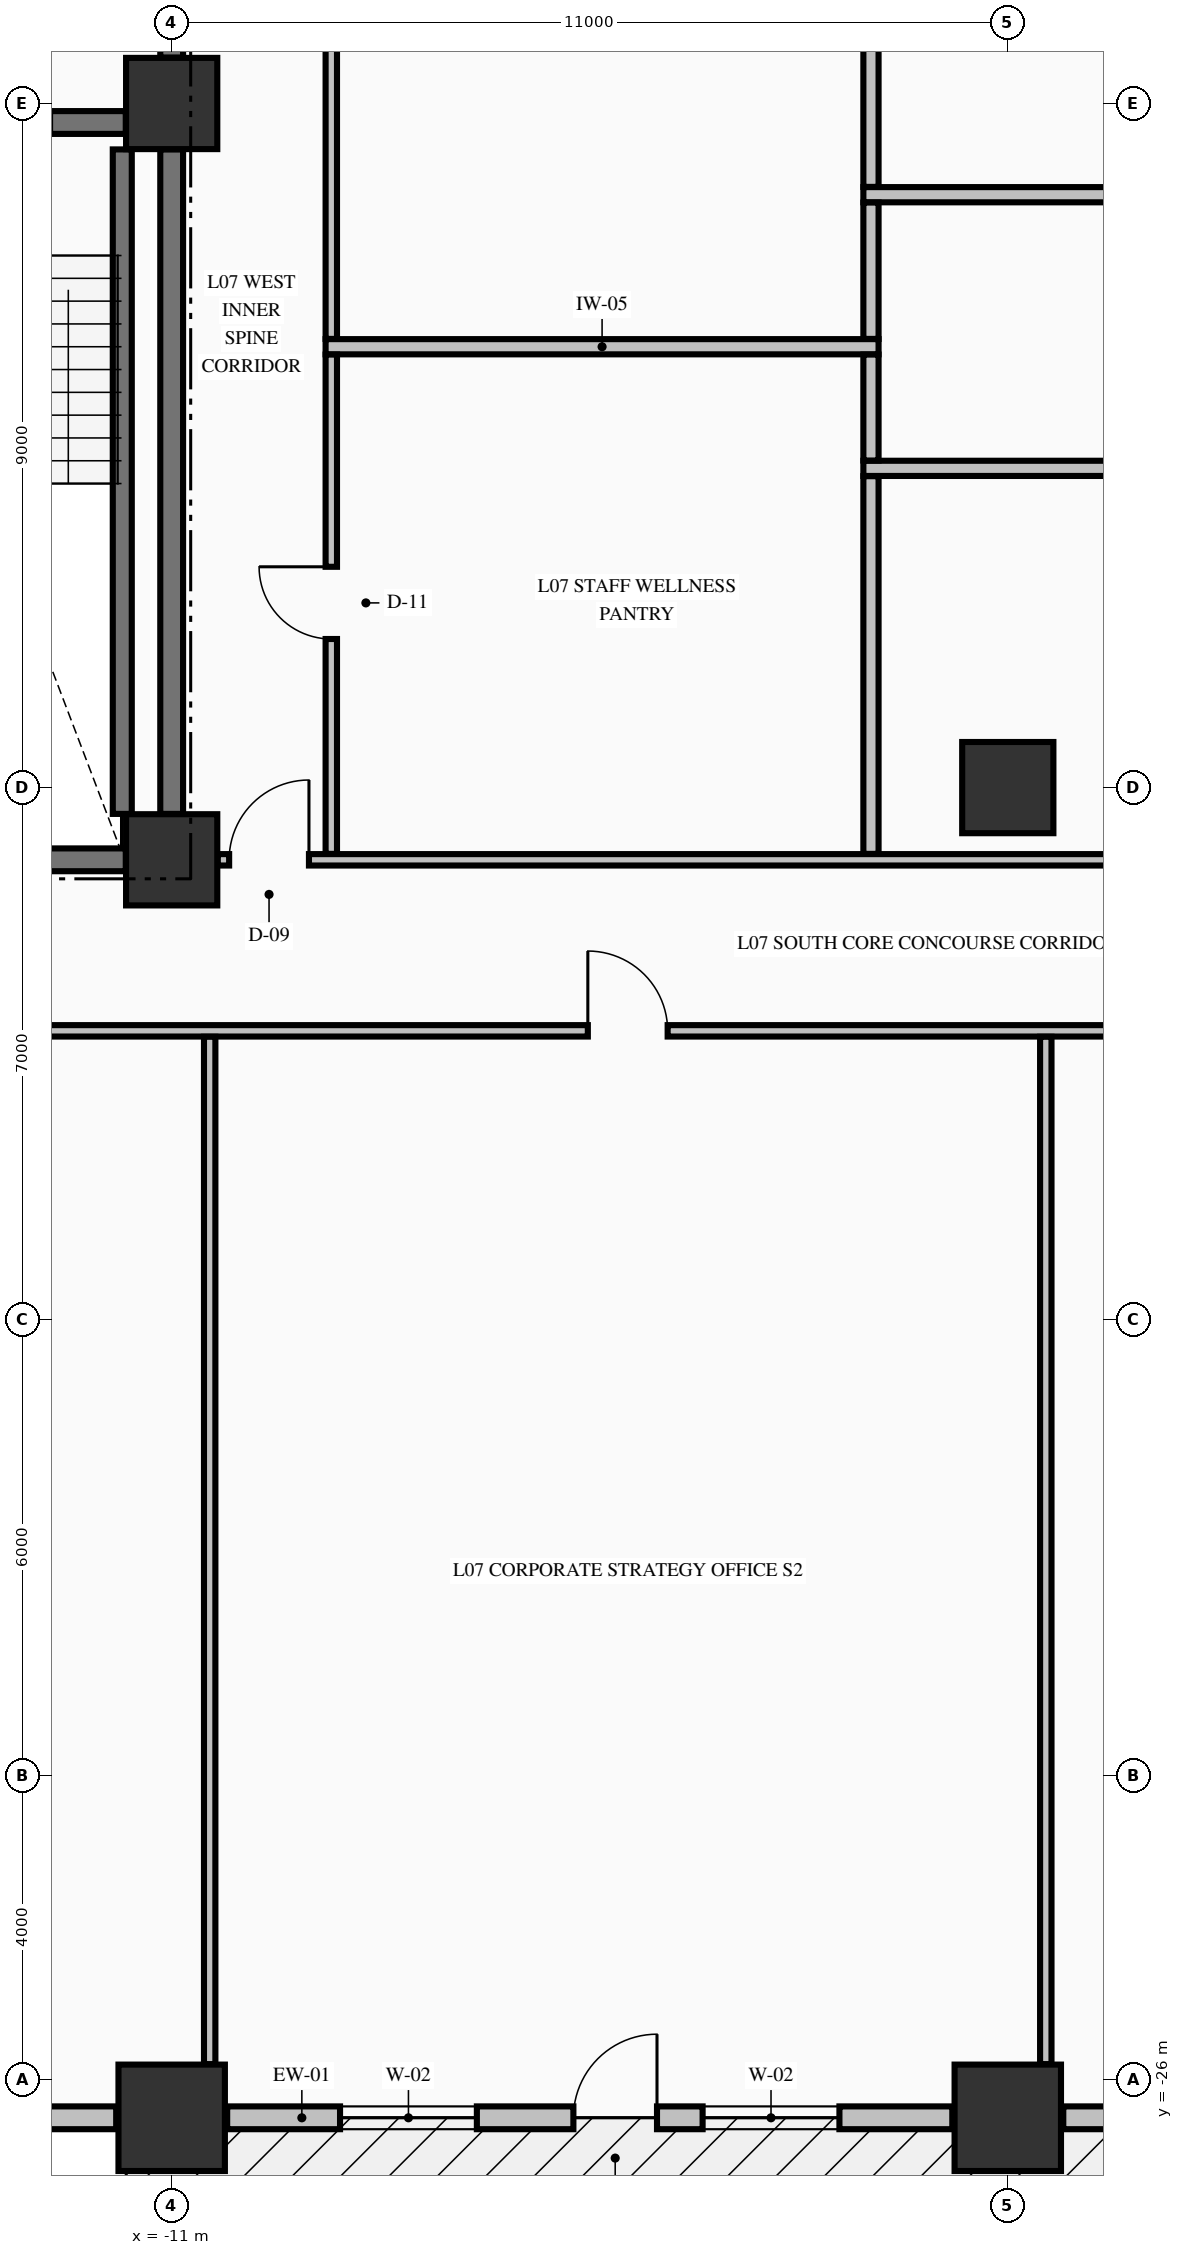
"""IFC4 building model, lengths in metres.
Left out: names, types, materials, properties, quantities, classifications, styles, units other than length and angle.
Written with IfcOpenShell. Run it as: python <this file> out.ifc"""

import sys

from ifc_helpers import new_model, si_unit, direction, frame, frame_2d, origin, origin_2d, place, context, subcontext, project, spatial, rectangle, extrude, element, fill, save


model = new_model("IFC4")
c1 = context("Model", 3, precision=1e-05, world=origin(), true_north=direction((0.0, 1.0)))
c2 = subcontext(c1, "Body", "Model", "MODEL_VIEW")
j1 = project(units=[si_unit("LENGTHUNIT", "METRE"), si_unit("PLANEANGLEUNIT", "RADIAN")], contexts=[c1])
p1 = place(None, origin())
s1 = spatial("IfcSite", under=j1, at=p1, CompositionType="ELEMENT")
p2 = place(p1, origin())
s2 = spatial("IfcBuilding", under=s1, at=p2, CompositionType="ELEMENT")
p3 = place(p2, frame((0.0, 0.0, 34.34)))
s3 = spatial("IfcBuildingStorey", under=s2, at=p3, CompositionType="ELEMENT", Elevation=34.34)
for number, where, z_axis, x_axis in (
    (1, (-11.0, -26.5, -0.3), (0.0, 0.0, 1.0), (1.0, 0.0, 0.0)),
    (2, (0.0, -26.5, -0.3), (0.0, 0.0, 1.0), (1.0, 0.0, 0.0)),
):
    element("IfcColumn", number, at=place(p3, frame(where, z_axis=z_axis, x_axis=x_axis)), inside=s3, PredefinedType="COLUMN", context=c2, shape_type="SweptSolid", body=[
        extrude(rectangle(XDim=1.4, YDim=1.4, at=origin_2d()), origin(), (0.0, 0.0, 1.0), 3.62),
    ])
for number, where, z_axis, x_axis in (
    (3, (-11.0, -9.95, -0.3), (0.0, 0.0, 1.0), (1.0, 0.0, 0.0)),
    (4, (-11.0, 0.0, -0.3), (0.0, 0.0, 1.0), (1.0, 0.0, 0.0)),
    (5, (0.0, -9.0, -0.3), (0.0, 0.0, 1.0), (1.0, 0.0, 0.0)),
):
    element("IfcColumn", number, at=place(p3, frame(where, z_axis=z_axis, x_axis=x_axis)), inside=s3, PredefinedType="COLUMN", context=c2, shape_type="SweptSolid", body=[
        extrude(rectangle(XDim=1.2, YDim=1.2, at=origin_2d()), origin(), (0.0, 0.0, 1.0), 3.62),
    ])
p4 = place(p3, frame((-19.77, -26.5, 0.0), z_axis=(0.0, 0.0, 1.0), x_axis=(1.0, 0.0, 0.0)))
e6 = element("IfcWall", 6, at=p4, inside=s3, PredefinedType="STANDARD", context=c2, shape_type="SweptSolid", body=[
    extrude(rectangle(XDim=8.04, YDim=0.3, at=frame_2d((4.02, 0.0))), origin(), (0.0, 0.0, 1.0), 2.712),
])
p5 = place(p3, frame((-10.27, -26.5, 0.0), z_axis=(0.0, 0.0, 1.0), x_axis=(1.0, 0.0, 0.0)))
e7 = element("IfcWall", 7, at=p5, inside=s3, PredefinedType="STANDARD", context=c2, shape_type="SweptSolid", body=[
    extrude(rectangle(XDim=9.54, YDim=0.3, at=frame_2d((4.77, 0.0))), origin(), (0.0, 0.0, 1.0), 2.712),
])
p6 = place(p5, frame((4.555, 0.0, 0.0)))
e8 = element("IfcOpeningElement", 8, at=p6, cuts=e7, PredefinedType="OPENING", context=c2, shape_type="SweptSolid", body=[
    extrude(rectangle(XDim=1.1, YDim=2.15, at=frame_2d((0.55, 1.075))), frame((0.0, 0.16, 0.0), z_axis=(0.0, -1.0, 0.0), x_axis=(1.0, 0.0, 0.0)), (0.0, 0.0, 1.0), 0.32),
])
p7 = place(p5, frame((1.485, 0.0, 0.78)))
e9 = element("IfcOpeningElement", 9, at=p7, cuts=e7, PredefinedType="OPENING", context=c2, shape_type="SweptSolid", body=[
    extrude(rectangle(XDim=1.8, YDim=1.72, at=frame_2d((0.9, 0.86))), frame((0.0, 0.16, 0.0), z_axis=(0.0, -1.0, 0.0), x_axis=(1.0, 0.0, 0.0)), (0.0, 0.0, 1.0), 0.32),
])
p8 = place(p5, frame((6.255, 0.0, 0.78)))
e10 = element("IfcOpeningElement", 10, at=p8, cuts=e7, PredefinedType="OPENING", context=c2, shape_type="SweptSolid", body=[
    extrude(rectangle(XDim=1.8, YDim=1.72, at=frame_2d((0.9, 0.86))), frame((0.0, 0.16, 0.0), z_axis=(0.0, -1.0, 0.0), x_axis=(1.0, 0.0, 0.0)), (0.0, 0.0, 1.0), 0.32),
])
p9 = place(p3, frame((0.73, -26.5, 0.0), z_axis=(0.0, 0.0, 1.0), x_axis=(1.0, 0.0, 0.0)))
e11 = element("IfcWall", 11, at=p9, inside=s3, PredefinedType="STANDARD", context=c2, shape_type="SweptSolid", body=[
    extrude(rectangle(XDim=9.54, YDim=0.3, at=frame_2d((4.77, 0.0))), origin(), (0.0, 0.0, 1.0), 2.712),
])
p10 = place(p9, frame((1.485, 0.0, 0.78)))
e12 = element("IfcOpeningElement", 12, at=p10, cuts=e11, PredefinedType="OPENING", context=c2, shape_type="SweptSolid", body=[
    extrude(rectangle(XDim=1.8, YDim=1.72, at=frame_2d((0.9, 0.86))), frame((0.0, 0.16, 0.0), z_axis=(0.0, -1.0, 0.0), x_axis=(1.0, 0.0, 0.0)), (0.0, 0.0, 1.0), 0.32),
])
p11 = place(p9, frame((3.87, 0.0, 0.78)))
e13 = element("IfcOpeningElement", 13, at=p11, cuts=e11, PredefinedType="OPENING", context=c2, shape_type="SweptSolid", body=[
    extrude(rectangle(XDim=1.8, YDim=1.72, at=frame_2d((0.9, 0.86))), frame((0.0, 0.16, 0.0), z_axis=(0.0, -1.0, 0.0), x_axis=(1.0, 0.0, 0.0)), (0.0, 0.0, 1.0), 0.32),
])
p12 = place(p9, frame((6.255, 0.0, 0.78)))
e14 = element("IfcOpeningElement", 14, at=p12, cuts=e11, PredefinedType="OPENING", context=c2, shape_type="SweptSolid", body=[
    extrude(rectangle(XDim=1.8, YDim=1.72, at=frame_2d((0.9, 0.86))), frame((0.0, 0.16, 0.0), z_axis=(0.0, -1.0, 0.0), x_axis=(1.0, 0.0, 0.0)), (0.0, 0.0, 1.0), 0.32),
])
p13 = place(p3, frame((-14.7, -9.95, 0.0), z_axis=(0.0, 0.0, 1.0), x_axis=(1.0, 0.0, 0.0)))
e15 = element("IfcWall", 15, at=p13, inside=s3, PredefinedType="SHEAR", context=c2, shape_type="SweptSolid", body=[
    extrude(rectangle(XDim=3.096, YDim=0.3, at=frame_2d((1.548, 0.0))), origin(), (0.0, 0.0, 1.0), 3.32),
])
p14 = place(p3, frame((-19.396, -0.25, 0.0), z_axis=(0.0, 0.0, 1.0), x_axis=(1.0, 0.0, 0.0)))
e16 = element("IfcWall", 16, at=p14, inside=s3, PredefinedType="SHEAR", context=c2, shape_type="SweptSolid", body=[
    extrude(rectangle(XDim=7.792, YDim=0.3, at=frame_2d((3.896, 0.0))), origin(), (0.0, 0.0, 1.0), 3.32),
])
p15 = place(p14, frame((5.696, 0.0, 0.0)))
e17 = element("IfcOpeningElement", 17, at=p15, cuts=e16, PredefinedType="OPENING", context=c2, shape_type="SweptSolid", body=[
    extrude(rectangle(XDim=1.1, YDim=2.15, at=frame_2d((0.55, 1.075))), frame((0.0, 0.16, 0.0), z_axis=(0.0, -1.0, 0.0), x_axis=(1.0, 0.0, 0.0)), (0.0, 0.0, 1.0), 0.32),
])
p16 = place(p3, frame((-23.835, -12.2, 0.0), z_axis=(0.0, 0.0, 1.0), x_axis=(1.0, 0.0, 0.0)))
e18 = element("IfcWall", 18, at=p16, inside=s3, PredefinedType="PARTITIONING", context=c2, shape_type="SweptSolid", body=[
    extrude(rectangle(XDim=52.67, YDim=0.15, at=frame_2d((26.335, 0.0))), origin(), (0.0, 0.0, 1.0), 3.32),
])
p17 = place(p16, frame((8.16, 0.0, 0.0)))
e19 = element("IfcOpeningElement", 19, at=p17, cuts=e18, PredefinedType="OPENING", context=c2, shape_type="SweptSolid", body=[
    extrude(rectangle(XDim=1.05, YDim=2.15, at=frame_2d((0.525, 1.075))), frame((0.0, 0.085, 0.0), z_axis=(0.0, -1.0, 0.0), x_axis=(1.0, 0.0, 0.0)), (0.0, 0.0, 1.0), 0.17),
])
p18 = place(p16, frame((18.31, 0.0, 0.0)))
e20 = element("IfcOpeningElement", 20, at=p18, cuts=e18, PredefinedType="OPENING", context=c2, shape_type="SweptSolid", body=[
    extrude(rectangle(XDim=1.05, YDim=2.15, at=frame_2d((0.525, 1.075))), frame((0.0, 0.085, 0.0), z_axis=(0.0, -1.0, 0.0), x_axis=(1.0, 0.0, 0.0)), (0.0, 0.0, 1.0), 0.17),
])
p19 = place(p16, frame((41.46, 0.0, 0.0)))
e21 = element("IfcOpeningElement", 21, at=p19, cuts=e18, PredefinedType="OPENING", context=c2, shape_type="SweptSolid", body=[
    extrude(rectangle(XDim=1.05, YDim=2.15, at=frame_2d((0.525, 1.075))), frame((0.0, 0.085, 0.0), z_axis=(0.0, -1.0, 0.0), x_axis=(1.0, 0.0, 0.0)), (0.0, 0.0, 1.0), 0.17),
])
p20 = place(p3, frame((-10.394, -9.95, 0.0), z_axis=(0.0, 0.0, 1.0), x_axis=(1.0, 0.0, 0.0)))
e22 = element("IfcWall", 22, at=p20, inside=s3, PredefinedType="PARTITIONING", context=c2, shape_type="SweptSolid", body=[
    extrude(rectangle(XDim=20.788, YDim=0.15, at=frame_2d((10.394, 0.0))), origin(), (0.0, 0.0, 1.0), 3.32),
])
p21 = place(p20, frame((0.15, 0.0, 0.0)))
e23 = element("IfcOpeningElement", 23, at=p21, cuts=e22, PredefinedType="OPENING", context=c2, shape_type="SweptSolid", body=[
    extrude(rectangle(XDim=1.05, YDim=2.15, at=frame_2d((0.525, 1.075))), frame((0.0, 0.085, 0.0), z_axis=(0.0, -1.0, 0.0), x_axis=(1.0, 0.0, 0.0)), (0.0, 0.0, 1.0), 0.17),
])
p22 = place(p20, frame((19.588, 0.0, 0.0)))
e24 = element("IfcOpeningElement", 24, at=p22, cuts=e22, PredefinedType="OPENING", context=c2, shape_type="SweptSolid", body=[
    extrude(rectangle(XDim=1.05, YDim=2.15, at=frame_2d((0.525, 1.075))), frame((0.0, 0.085, 0.0), z_axis=(0.0, -1.0, 0.0), x_axis=(1.0, 0.0, 0.0)), (0.0, 0.0, 1.0), 0.17),
])
p23 = place(p20, frame((11.969, 0.0, 0.0)))
e25 = element("IfcOpeningElement", 25, at=p23, cuts=e22, PredefinedType="OPENING", context=c2, shape_type="SweptSolid", body=[
    extrude(rectangle(XDim=0.95, YDim=2.15, at=frame_2d((0.475, 1.075))), frame((0.0, 0.085, 0.0), z_axis=(0.0, -1.0, 0.0), x_axis=(1.0, 0.0, 0.0)), (0.0, 0.0, 1.0), 0.17),
])
p24 = place(p3, frame((-1.9, -4.8, 0.0), z_axis=(0.0, 0.0, 1.0), x_axis=(1.0, 0.0, 0.0)))
e26 = element("IfcWall", 26, at=p24, inside=s3, PredefinedType="PARTITIONING", context=c2, shape_type="SweptSolid", body=[
    extrude(rectangle(XDim=10.875, YDim=0.2, at=frame_2d((5.438, 0.0))), origin(), (0.0, 0.0, 1.0), 3.32),
])
p25 = place(p3, frame((-8.975, -3.2, 0.0), z_axis=(0.0, 0.0, 1.0), x_axis=(1.0, 0.0, 0.0)))
e27 = element("IfcWall", 27, at=p25, inside=s3, PredefinedType="PARTITIONING", context=c2, shape_type="SweptSolid", body=[
    extrude(rectangle(XDim=7.275, YDim=0.2, at=frame_2d((3.638, 0.0))), origin(), (0.0, 0.0, 1.0), 3.32),
])
p26 = place(p3, frame((-1.9, -1.2, 0.0), z_axis=(0.0, 0.0, 1.0), x_axis=(1.0, 0.0, 0.0)))
e28 = element("IfcWall", 28, at=p26, inside=s3, PredefinedType="PARTITIONING", context=c2, shape_type="SweptSolid", body=[
    extrude(rectangle(XDim=10.875, YDim=0.2, at=frame_2d((5.438, 0.0))), origin(), (0.0, 0.0, 1.0), 3.32),
])
p27 = place(p3, frame((-11.65, -9.346, 0.0), z_axis=(0.0, 0.0, 1.0), x_axis=(0.0, 1.0, 0.0)))
e29 = element("IfcWall", 29, at=p27, inside=s3, PredefinedType="SOLIDWALL", context=c2, shape_type="SweptSolid", body=[
    extrude(rectangle(XDim=8.742, YDim=0.25, at=frame_2d((4.371, 0.0))), origin(), (0.0, 0.0, 1.0), 3.32),
])
p28 = place(p3, frame((-11.0, -9.346, 0.0), z_axis=(0.0, 0.0, 1.0), x_axis=(0.0, 1.0, 0.0)))
e30 = element("IfcWall", 30, at=p28, inside=s3, PredefinedType="SHEAR", context=c2, shape_type="SweptSolid", body=[
    extrude(rectangle(XDim=8.742, YDim=0.3, at=frame_2d((4.371, 0.0))), origin(), (0.0, 0.0, 1.0), 3.32),
])
p29 = place(p3, frame((-11.0, 0.604, 0.0), z_axis=(0.0, 0.0, 1.0), x_axis=(0.0, 1.0, 0.0)))
e31 = element("IfcWall", 31, at=p29, inside=s3, PredefinedType="SHEAR", context=c2, shape_type="SweptSolid", body=[
    extrude(rectangle(XDim=2.144, YDim=0.3, at=frame_2d((1.072, 0.0))), origin(), (0.0, 0.0, 1.0), 3.32),
])
p30 = place(p29, frame((0.496, 0.0, 0.0)))
e32 = element("IfcOpeningElement", 32, at=p30, cuts=e31, PredefinedType="OPENING", context=c2, shape_type="SweptSolid", body=[
    extrude(rectangle(XDim=1.1, YDim=2.15, at=frame_2d((0.55, 1.075))), frame((0.0, 0.16, 0.0), z_axis=(0.0, -1.0, 0.0), x_axis=(1.0, 0.0, 0.0)), (0.0, 0.0, 1.0), 0.32),
])
p31 = place(p3, frame((-10.5, -25.794, 0.0), z_axis=(0.0, 0.0, 1.0), x_axis=(0.0, 1.0, 0.0)))
e33 = element("IfcWall", 33, at=p31, inside=s3, PredefinedType="PARTITIONING", context=c2, shape_type="SweptSolid", body=[
    extrude(rectangle(XDim=13.516, YDim=0.15, at=frame_2d((6.758, 0.0))), origin(), (0.0, 0.0, 1.0), 3.32),
])
p32 = place(p3, frame((-8.9, -9.872, 0.0), z_axis=(0.0, 0.0, 1.0), x_axis=(0.0, 1.0, 0.0)))
e34 = element("IfcWall", 34, at=p32, inside=s3, PredefinedType="PARTITIONING", context=c2, shape_type="SweptSolid", body=[
    extrude(rectangle(XDim=6.569, YDim=0.15, at=frame_2d((3.285, 0.0))), origin(), (0.0, 0.0, 1.0), 3.32),
])
p33 = place(p32, frame((2.827, 0.0, 0.0)))
e35 = element("IfcOpeningElement", 35, at=p33, cuts=e34, PredefinedType="OPENING", context=c2, shape_type="SweptSolid", body=[
    extrude(rectangle(XDim=0.95, YDim=2.15, at=frame_2d((0.475, 1.075))), frame((0.0, 0.085, 0.0), z_axis=(0.0, -1.0, 0.0), x_axis=(1.0, 0.0, 0.0)), (0.0, 0.0, 1.0), 0.17),
])
p34 = place(p3, frame((-8.9, -3.097, 0.0), z_axis=(0.0, 0.0, 1.0), x_axis=(0.0, 1.0, 0.0)))
e36 = element("IfcWall", 36, at=p34, inside=s3, PredefinedType="PARTITIONING", context=c2, shape_type="SweptSolid", body=[
    extrude(rectangle(XDim=13.519, YDim=0.15, at=frame_2d((6.76, 0.0))), origin(), (0.0, 0.0, 1.0), 3.32),
])
p35 = place(p34, frame((6.222, 0.0, 0.0)))
e37 = element("IfcOpeningElement", 37, at=p35, cuts=e36, PredefinedType="OPENING", context=c2, shape_type="SweptSolid", body=[
    extrude(rectangle(XDim=1.05, YDim=2.15, at=frame_2d((0.525, 1.075))), frame((0.0, 0.085, 0.0), z_axis=(0.0, -1.0, 0.0), x_axis=(1.0, 0.0, 0.0)), (0.0, 0.0, 1.0), 0.17),
])
p36 = place(p3, frame((-1.8, -9.872, 0.0), z_axis=(0.0, 0.0, 1.0), x_axis=(0.0, 1.0, 0.0)))
e38 = element("IfcWall", 38, at=p36, inside=s3, PredefinedType="PARTITIONING", context=c2, shape_type="SweptSolid", body=[
    extrude(rectangle(XDim=4.969, YDim=0.2, at=frame_2d((2.484, 0.0))), origin(), (0.0, 0.0, 1.0), 3.32),
])
p37 = place(p3, frame((-1.8, -4.697, 0.0), z_axis=(0.0, 0.0, 1.0), x_axis=(0.0, 1.0, 0.0)))
e39 = element("IfcWall", 39, at=p37, inside=s3, PredefinedType="PARTITIONING", context=c2, shape_type="SweptSolid", body=[
    extrude(rectangle(XDim=1.394, YDim=0.2, at=frame_2d((0.697, 0.0))), origin(), (0.0, 0.0, 1.0), 3.32),
])
p38 = place(p3, frame((-1.8, -3.097, 0.0), z_axis=(0.0, 0.0, 1.0), x_axis=(0.0, 1.0, 0.0)))
e40 = element("IfcWall", 40, at=p38, inside=s3, PredefinedType="PARTITIONING", context=c2, shape_type="SweptSolid", body=[
    extrude(rectangle(XDim=1.794, YDim=0.2, at=frame_2d((0.897, 0.0))), origin(), (0.0, 0.0, 1.0), 3.32),
])
p39 = place(p3, frame((-1.8, -1.097, 0.0), z_axis=(0.0, 0.0, 1.0), x_axis=(0.0, 1.0, 0.0)))
e41 = element("IfcWall", 41, at=p39, inside=s3, PredefinedType="PARTITIONING", context=c2, shape_type="SweptSolid", body=[
    extrude(rectangle(XDim=11.519, YDim=0.2, at=frame_2d((5.76, 0.0))), origin(), (0.0, 0.0, 1.0), 3.32),
])
p40 = place(p3, frame((0.5, -25.794, 0.0), z_axis=(0.0, 0.0, 1.0), x_axis=(0.0, 1.0, 0.0)))
e42 = element("IfcWall", 42, at=p40, inside=s3, PredefinedType="PARTITIONING", context=c2, shape_type="SweptSolid", body=[
    extrude(rectangle(XDim=13.516, YDim=0.15, at=frame_2d((6.758, 0.0))), origin(), (0.0, 0.0, 1.0), 3.32),
])
p41 = place(p6, origin())
e43 = element("IfcDoor", 43, at=p41, inside=s3, OperationType="SINGLE_SWING_RIGHT", PredefinedType="DOOR", context=c2, shape_type="SweptSolid", body=[
    extrude(rectangle(XDim=1.1, YDim=2.15, at=frame_2d((0.55, 1.075))), frame((0.0, 0.025, 0.0), z_axis=(0.0, -1.0, 0.0), x_axis=(1.0, 0.0, 0.0)), (0.0, 0.0, 1.0), 0.05),
])
fill(e8, e43)
p42 = place(p7, origin())
e44 = element("IfcWindow", 44, at=p42, inside=s3, PartitioningType="SINGLE_PANEL", PredefinedType="WINDOW", context=c2, shape_type="SweptSolid", body=[
    extrude(rectangle(XDim=1.8, YDim=1.72, at=frame_2d((0.9, 0.86))), frame((0.0, 0.03, 0.0), z_axis=(0.0, -1.0, 0.0), x_axis=(1.0, 0.0, 0.0)), (0.0, 0.0, 1.0), 0.06),
])
fill(e9, e44)
p43 = place(p8, origin())
e45 = element("IfcWindow", 45, at=p43, inside=s3, PartitioningType="SINGLE_PANEL", PredefinedType="WINDOW", context=c2, shape_type="SweptSolid", body=[
    extrude(rectangle(XDim=1.8, YDim=1.72, at=frame_2d((0.9, 0.86))), frame((0.0, 0.03, 0.0), z_axis=(0.0, -1.0, 0.0), x_axis=(1.0, 0.0, 0.0)), (0.0, 0.0, 1.0), 0.06),
])
fill(e10, e45)
p44 = place(p21, origin())
e46 = element("IfcDoor", 46, at=p44, inside=s3, OperationType="SINGLE_SWING_RIGHT", PredefinedType="DOOR", context=c2, shape_type="SweptSolid", body=[
    extrude(rectangle(XDim=1.05, YDim=2.15, at=frame_2d((0.525, 1.075))), frame((0.0, 0.025, 0.0), z_axis=(0.0, -1.0, 0.0), x_axis=(1.0, 0.0, 0.0)), (0.0, 0.0, 1.0), 0.05),
])
fill(e23, e46)
p45 = place(p18, origin())
e47 = element("IfcDoor", 47, at=p45, inside=s3, OperationType="SINGLE_SWING_LEFT", PredefinedType="DOOR", context=c2, shape_type="SweptSolid", body=[
    extrude(rectangle(XDim=1.05, YDim=2.15, at=frame_2d((0.525, 1.075))), frame((0.0, 0.025, 0.0), z_axis=(0.0, -1.0, 0.0), x_axis=(1.0, 0.0, 0.0)), (0.0, 0.0, 1.0), 0.05),
])
fill(e20, e47)
p46 = place(p33, origin())
e48 = element("IfcDoor", 48, at=p46, inside=s3, OperationType="SINGLE_SWING_RIGHT", PredefinedType="DOOR", context=c2, shape_type="SweptSolid", body=[
    extrude(rectangle(XDim=0.95, YDim=2.15, at=frame_2d((0.475, 1.075))), frame((0.0, 0.025, 0.0), z_axis=(0.0, -1.0, 0.0), x_axis=(1.0, 0.0, 0.0)), (0.0, 0.0, 1.0), 0.05),
])
fill(e35, e48)
save(model, sys.argv[1])
